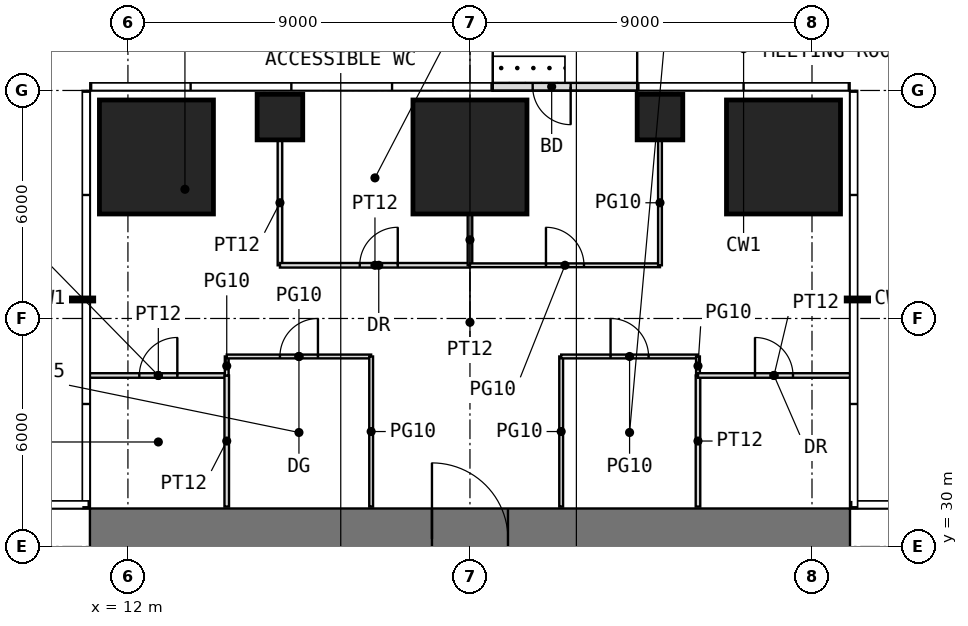
"""IFC4 building model, lengths in metres.
Left out: names, types, materials, properties, quantities, classifications, styles, units other than length and angle.
Written with IfcOpenShell. Run it as: python <this file> out.ifc"""

import sys

from ifc_helpers import new_model, si_unit, direction, frame, frame_2d, origin, origin_2d, place, context, subcontext, project, spatial, rectangle, extrude, element, fill, save


model = new_model("IFC4")
c1 = context("Model", 3, precision=1e-05, world=origin(), true_north=direction((0.0, 1.0)))
c2 = subcontext(c1, "Body", "Model", "MODEL_VIEW")
j1 = project(units=[si_unit("LENGTHUNIT", "METRE"), si_unit("PLANEANGLEUNIT", "RADIAN")], contexts=[c1])
p1 = place(None, origin())
s1 = spatial("IfcSite", under=j1, at=p1, CompositionType="ELEMENT")
p2 = place(p1, origin())
s2 = spatial("IfcBuilding", under=s1, at=p2, CompositionType="ELEMENT")
p3 = place(p2, frame((0.0, 0.0, 104.5)))
s3 = spatial("IfcBuildingStorey", under=s2, at=p3, CompositionType="ELEMENT", Elevation=104.5)
p4 = place(p3, frame((12.75, 40.25, 0.0), z_axis=(0.0, 0.0, 1.0), x_axis=(1.0, 0.0, 0.0)))
e1 = element("IfcColumn", 1, at=p4, inside=s3, PredefinedType="COLUMN", context=c2, shape_type="SweptSolid", body=[
    extrude(rectangle(XDim=3.0, YDim=3.0, at=origin_2d()), origin(), (0.0, 0.0, 1.0), 4.0),
])
p5 = place(p3, frame((16.0, 41.3, 0.0), z_axis=(0.0, 0.0, 1.0), x_axis=(1.0, 0.0, 0.0)))
e2 = element("IfcColumn", 2, at=p5, inside=s3, PredefinedType="COLUMN", context=c2, shape_type="SweptSolid", body=[
    extrude(rectangle(XDim=1.2, YDim=1.2, at=origin_2d()), origin(), (0.0, 0.0, 1.0), 4.0),
])
p6 = place(p3, frame((21.0, 40.25, 0.0), z_axis=(0.0, 0.0, 1.0), x_axis=(1.0, 0.0, 0.0)))
e3 = element("IfcColumn", 3, at=p6, inside=s3, PredefinedType="COLUMN", context=c2, shape_type="SweptSolid", body=[
    extrude(rectangle(XDim=3.0, YDim=3.0, at=origin_2d()), origin(), (0.0, 0.0, 1.0), 4.0),
])
p7 = place(p3, frame((26.0, 41.3, 0.0), z_axis=(0.0, 0.0, 1.0), x_axis=(1.0, 0.0, 0.0)))
e4 = element("IfcColumn", 4, at=p7, inside=s3, PredefinedType="COLUMN", context=c2, shape_type="SweptSolid", body=[
    extrude(rectangle(XDim=1.2, YDim=1.2, at=origin_2d()), origin(), (0.0, 0.0, 1.0), 4.0),
])
p8 = place(p3, frame((29.25, 40.25, 0.0), z_axis=(0.0, 0.0, 1.0), x_axis=(1.0, 0.0, 0.0)))
e5 = element("IfcColumn", 5, at=p8, inside=s3, PredefinedType="COLUMN", context=c2, shape_type="SweptSolid", body=[
    extrude(rectangle(XDim=3.0, YDim=3.0, at=origin_2d()), origin(), (0.0, 0.0, 1.0), 4.0),
])
p9 = place(p3, frame((25.4, 42.1, 0.0), z_axis=(0.0, 0.0, 1.0), x_axis=(-1.0, 0.0, 0.0)))
e6 = element("IfcWall", 6, at=p9, inside=s3, PredefinedType="USERDEFINED", context=c2, shape_type="SweptSolid", body=[
    extrude(rectangle(XDim=3.8, YDim=0.2, at=frame_2d((1.9, 0.0))), origin(), (0.0, 0.0, 1.0), 3.75),
])
p10 = place(p9, frame((1.75, 0.0, 0.0)))
e7 = element("IfcOpeningElement", 7, at=p10, cuts=e6, PredefinedType="OPENING", context=c2, shape_type="SweptSolid", body=[
    extrude(rectangle(XDim=1.0, YDim=2.4, at=frame_2d((0.5, 1.2))), frame((0.0, 0.11, 0.0), z_axis=(0.0, -1.0, 0.0), x_axis=(1.0, 0.0, 0.0)), (0.0, 0.0, 1.0), 0.22),
])
p11 = place(p3, frame((11.0, 30.2, -0.05), z_axis=(0.0, 0.0, 1.0), x_axis=(1.0, 0.0, 0.0)))
e8 = element("IfcWall", 8, at=p11, inside=s3, PredefinedType="SHEAR", context=c2, shape_type="SweptSolid", body=[
    extrude(rectangle(XDim=20.0, YDim=1.6, at=frame_2d((10.0, 0.0))), origin(), (0.0, 0.0, 1.0), 4.0),
])
p12 = place(p11, frame((9.0, 0.0, 0.05)))
e9 = element("IfcOpeningElement", 9, at=p12, cuts=e8, PredefinedType="OPENING", context=c2, shape_type="SweptSolid", body=[
    extrude(rectangle(XDim=2.0, YDim=2.2, at=frame_2d((1.0, 1.1))), frame((0.0, 0.81, 0.0), z_axis=(0.0, -1.0, 0.0), x_axis=(1.0, 0.0, 0.0)), (0.0, 0.0, 1.0), 1.62),
])
p13 = place(p3, frame((11.0, 34.5, 0.0), z_axis=(0.0, 0.0, 1.0), x_axis=(1.0, 0.0, 0.0)))
e10 = element("IfcWall", 10, at=p13, inside=s3, PredefinedType="PARTITIONING", context=c2, shape_type="SweptSolid", body=[
    extrude(rectangle(XDim=3.6, YDim=0.12, at=frame_2d((1.8, 0.0))), origin(), (0.0, 0.0, 1.0), 3.75),
])
p14 = place(p13, frame((1.3, 0.0, 0.0)))
e11 = element("IfcOpeningElement", 11, at=p14, cuts=e10, PredefinedType="OPENING", context=c2, shape_type="SweptSolid", body=[
    extrude(rectangle(XDim=1.0, YDim=2.2, at=frame_2d((0.5, 1.1))), frame((0.0, 0.07, 0.0), z_axis=(0.0, -1.0, 0.0), x_axis=(1.0, 0.0, 0.0)), (0.0, 0.0, 1.0), 0.14),
])
p15 = place(p3, frame((14.6, 31.05, 0.0), z_axis=(0.0, 0.0, 1.0), x_axis=(0.0, 1.0, 0.0)))
e12 = element("IfcWall", 12, at=p15, inside=s3, PredefinedType="PARTITIONING", context=c2, shape_type="SweptSolid", body=[
    extrude(rectangle(XDim=3.45, YDim=0.12, at=frame_2d((1.725, 0.0))), origin(), (0.0, 0.0, 1.0), 3.75),
])
p16 = place(p3, frame((14.6, 34.5, 0.0), z_axis=(0.0, 0.0, 1.0), x_axis=(0.0, 1.0, 0.0)))
e13 = element("IfcWall", 13, at=p16, inside=s3, PredefinedType="PARTITIONING", context=c2, shape_type="SweptSolid", body=[
    extrude(rectangle(XDim=0.5, YDim=0.1, at=frame_2d((0.25, 0.0))), origin(), (0.0, 0.0, 1.0), 3.75),
])
p17 = place(p3, frame((14.6, 35.0, 0.0), z_axis=(0.0, 0.0, 1.0), x_axis=(1.0, 0.0, 0.0)))
e14 = element("IfcWall", 14, at=p17, inside=s3, PredefinedType="PARTITIONING", context=c2, shape_type="SweptSolid", body=[
    extrude(rectangle(XDim=3.8, YDim=0.1, at=frame_2d((1.9, 0.0))), origin(), (0.0, 0.0, 1.0), 3.75),
])
p18 = place(p17, frame((1.4, 0.0, 0.0)))
e15 = element("IfcOpeningElement", 15, at=p18, cuts=e14, PredefinedType="OPENING", context=c2, shape_type="SweptSolid", body=[
    extrude(rectangle(XDim=1.0, YDim=2.4, at=frame_2d((0.5, 1.2))), frame((0.0, 0.06, 0.0), z_axis=(0.0, -1.0, 0.0), x_axis=(1.0, 0.0, 0.0)), (0.0, 0.0, 1.0), 0.12),
])
p19 = place(p3, frame((16.0, 37.4, 0.0), z_axis=(0.0, 0.0, 1.0), x_axis=(0.0, 1.0, 0.0)))
e16 = element("IfcWall", 16, at=p19, inside=s3, PredefinedType="PARTITIONING", context=c2, shape_type="SweptSolid", body=[
    extrude(rectangle(XDim=3.29, YDim=0.12, at=frame_2d((1.645, 0.0))), origin(), (0.0, 0.0, 1.0), 3.75),
])
p20 = place(p3, frame((16.0, 37.4, 0.0), z_axis=(0.0, 0.0, 1.0), x_axis=(1.0, 0.0, 0.0)))
e17 = element("IfcWall", 17, at=p20, inside=s3, PredefinedType="PARTITIONING", context=c2, shape_type="SweptSolid", body=[
    extrude(rectangle(XDim=5.0, YDim=0.12, at=frame_2d((2.5, 0.0))), origin(), (0.0, 0.0, 1.0), 3.75),
])
p21 = place(p20, frame((2.1, 0.0, 0.0)))
e18 = element("IfcOpeningElement", 18, at=p21, cuts=e17, PredefinedType="OPENING", context=c2, shape_type="SweptSolid", body=[
    extrude(rectangle(XDim=1.0, YDim=2.2, at=frame_2d((0.5, 1.1))), frame((0.0, 0.07, 0.0), z_axis=(0.0, -1.0, 0.0), x_axis=(1.0, 0.0, 0.0)), (0.0, 0.0, 1.0), 0.14),
])
p22 = place(p3, frame((18.4, 31.05, 0.0), z_axis=(0.0, 0.0, 1.0), x_axis=(0.0, 1.0, 0.0)))
e19 = element("IfcWall", 19, at=p22, inside=s3, PredefinedType="PARTITIONING", context=c2, shape_type="SweptSolid", body=[
    extrude(rectangle(XDim=3.95, YDim=0.1, at=frame_2d((1.975, 0.0))), origin(), (0.0, 0.0, 1.0), 3.75),
])
p23 = place(p3, frame((21.0, 37.4, 0.0), z_axis=(0.0, 0.0, 1.0), x_axis=(0.0, 1.0, 0.0)))
e20 = element("IfcWall", 20, at=p23, inside=s3, PredefinedType="PARTITIONING", context=c2, shape_type="SweptSolid", body=[
    extrude(rectangle(XDim=1.34, YDim=0.12, at=frame_2d((0.67, 0.0))), origin(), (0.0, 0.0, 1.0), 3.75),
])
p24 = place(p3, frame((21.0, 37.4, 0.0), z_axis=(0.0, 0.0, 1.0), x_axis=(1.0, 0.0, 0.0)))
e21 = element("IfcWall", 21, at=p24, inside=s3, PredefinedType="PARTITIONING", context=c2, shape_type="SweptSolid", body=[
    extrude(rectangle(XDim=5.0, YDim=0.1, at=frame_2d((2.5, 0.0))), origin(), (0.0, 0.0, 1.0), 3.75),
])
p25 = place(p24, frame((2.0, 0.0, 0.0)))
e22 = element("IfcOpeningElement", 22, at=p25, cuts=e21, PredefinedType="OPENING", context=c2, shape_type="SweptSolid", body=[
    extrude(rectangle(XDim=1.0, YDim=2.4, at=frame_2d((0.5, 1.2))), frame((0.0, 0.06, 0.0), z_axis=(0.0, -1.0, 0.0), x_axis=(1.0, 0.0, 0.0)), (0.0, 0.0, 1.0), 0.12),
])
p26 = place(p3, frame((23.4, 31.05, 0.0), z_axis=(0.0, 0.0, 1.0), x_axis=(0.0, 1.0, 0.0)))
e23 = element("IfcWall", 23, at=p26, inside=s3, PredefinedType="PARTITIONING", context=c2, shape_type="SweptSolid", body=[
    extrude(rectangle(XDim=3.95, YDim=0.1, at=frame_2d((1.975, 0.0))), origin(), (0.0, 0.0, 1.0), 3.75),
])
p27 = place(p3, frame((23.4, 35.0, 0.0), z_axis=(0.0, 0.0, 1.0), x_axis=(1.0, 0.0, 0.0)))
e24 = element("IfcWall", 24, at=p27, inside=s3, PredefinedType="PARTITIONING", context=c2, shape_type="SweptSolid", body=[
    extrude(rectangle(XDim=3.6, YDim=0.1, at=frame_2d((1.8, 0.0))), origin(), (0.0, 0.0, 1.0), 3.75),
])
p28 = place(p27, frame((1.3, 0.0, 0.0)))
e25 = element("IfcOpeningElement", 25, at=p28, cuts=e24, PredefinedType="OPENING", context=c2, shape_type="SweptSolid", body=[
    extrude(rectangle(XDim=1.0, YDim=2.4, at=frame_2d((0.5, 1.2))), frame((0.0, 0.06, 0.0), z_axis=(0.0, -1.0, 0.0), x_axis=(1.0, 0.0, 0.0)), (0.0, 0.0, 1.0), 0.12),
])
p29 = place(p3, frame((26.0, 37.4, 0.0), z_axis=(0.0, 0.0, 1.0), x_axis=(0.0, 1.0, 0.0)))
e26 = element("IfcWall", 26, at=p29, inside=s3, PredefinedType="PARTITIONING", context=c2, shape_type="SweptSolid", body=[
    extrude(rectangle(XDim=3.29, YDim=0.1, at=frame_2d((1.645, 0.0))), origin(), (0.0, 0.0, 1.0), 3.75),
])
p30 = place(p3, frame((27.0, 31.05, 0.0), z_axis=(0.0, 0.0, 1.0), x_axis=(0.0, 1.0, 0.0)))
e27 = element("IfcWall", 27, at=p30, inside=s3, PredefinedType="PARTITIONING", context=c2, shape_type="SweptSolid", body=[
    extrude(rectangle(XDim=3.45, YDim=0.12, at=frame_2d((1.725, 0.0))), origin(), (0.0, 0.0, 1.0), 3.75),
])
p31 = place(p3, frame((27.0, 34.5, 0.0), z_axis=(0.0, 0.0, 1.0), x_axis=(0.0, 1.0, 0.0)))
e28 = element("IfcWall", 28, at=p31, inside=s3, PredefinedType="PARTITIONING", context=c2, shape_type="SweptSolid", body=[
    extrude(rectangle(XDim=0.5, YDim=0.1, at=frame_2d((0.25, 0.0))), origin(), (0.0, 0.0, 1.0), 3.75),
])
p32 = place(p3, frame((27.0, 34.5, 0.0), z_axis=(0.0, 0.0, 1.0), x_axis=(1.0, 0.0, 0.0)))
e29 = element("IfcWall", 29, at=p32, inside=s3, PredefinedType="PARTITIONING", context=c2, shape_type="SweptSolid", body=[
    extrude(rectangle(XDim=4.0, YDim=0.12, at=frame_2d((2.0, 0.0))), origin(), (0.0, 0.0, 1.0), 3.75),
])
p33 = place(p32, frame((1.5, 0.0, 0.0)))
e30 = element("IfcOpeningElement", 30, at=p33, cuts=e29, PredefinedType="OPENING", context=c2, shape_type="SweptSolid", body=[
    extrude(rectangle(XDim=1.0, YDim=2.2, at=frame_2d((0.5, 1.1))), frame((0.0, 0.07, 0.0), z_axis=(0.0, -1.0, 0.0), x_axis=(1.0, 0.0, 0.0)), (0.0, 0.0, 1.0), 0.14),
])
p34 = place(p10, origin())
e31 = element("IfcDoor", 31, at=p34, inside=s3, OperationType="SINGLE_SWING_LEFT", PredefinedType="DOOR", context=c2, shape_type="SweptSolid", body=[
    extrude(rectangle(XDim=1.0, YDim=2.4, at=frame_2d((0.5, 1.2))), frame((0.0, 0.025, 0.0), z_axis=(0.0, -1.0, 0.0), x_axis=(1.0, 0.0, 0.0)), (0.0, 0.0, 1.0), 0.05),
])
fill(e7, e31)
p35 = place(p12, origin())
e32 = element("IfcDoor", 32, at=p35, inside=s3, OperationType="DOUBLE_DOOR_SINGLE_SWING", PredefinedType="DOOR", context=c2, shape_type="SweptSolid", body=[
    extrude(rectangle(XDim=2.0, YDim=2.2, at=frame_2d((1.0, 1.1))), frame((0.0, 0.025, 0.0), z_axis=(0.0, -1.0, 0.0), x_axis=(1.0, 0.0, 0.0)), (0.0, 0.0, 1.0), 0.05),
])
fill(e9, e32)
p36 = place(p14, origin())
e33 = element("IfcDoor", 33, at=p36, inside=s3, OperationType="SINGLE_SWING_RIGHT", PredefinedType="DOOR", context=c2, shape_type="SweptSolid", body=[
    extrude(rectangle(XDim=1.0, YDim=2.2, at=frame_2d((0.5, 1.1))), frame((0.0, 0.025, 0.0), z_axis=(0.0, -1.0, 0.0), x_axis=(1.0, 0.0, 0.0)), (0.0, 0.0, 1.0), 0.05),
])
fill(e11, e33)
p37 = place(p18, origin())
e34 = element("IfcDoor", 34, at=p37, inside=s3, OperationType="SINGLE_SWING_RIGHT", PredefinedType="DOOR", context=c2, shape_type="SweptSolid", body=[
    extrude(rectangle(XDim=1.0, YDim=2.4, at=frame_2d((0.5, 1.2))), frame((0.0, 0.025, 0.0), z_axis=(0.0, -1.0, 0.0), x_axis=(1.0, 0.0, 0.0)), (0.0, 0.0, 1.0), 0.05),
])
fill(e15, e34)
p38 = place(p28, origin())
e35 = element("IfcDoor", 35, at=p38, inside=s3, OperationType="SINGLE_SWING_LEFT", PredefinedType="DOOR", context=c2, shape_type="SweptSolid", body=[
    extrude(rectangle(XDim=1.0, YDim=2.4, at=frame_2d((0.5, 1.2))), frame((0.0, 0.025, 0.0), z_axis=(0.0, -1.0, 0.0), x_axis=(1.0, 0.0, 0.0)), (0.0, 0.0, 1.0), 0.05),
])
fill(e25, e35)
p39 = place(p33, origin())
e36 = element("IfcDoor", 36, at=p39, inside=s3, OperationType="SINGLE_SWING_LEFT", PredefinedType="DOOR", context=c2, shape_type="SweptSolid", body=[
    extrude(rectangle(XDim=1.0, YDim=2.2, at=frame_2d((0.5, 1.1))), frame((0.0, 0.025, 0.0), z_axis=(0.0, -1.0, 0.0), x_axis=(1.0, 0.0, 0.0)), (0.0, 0.0, 1.0), 0.05),
])
fill(e30, e36)
p40 = place(p21, origin())
e37 = element("IfcDoor", 37, at=p40, inside=s3, OperationType="SINGLE_SWING_RIGHT", PredefinedType="DOOR", context=c2, shape_type="SweptSolid", body=[
    extrude(rectangle(XDim=1.0, YDim=2.2, at=frame_2d((0.5, 1.1))), frame((0.0, 0.025, 0.0), z_axis=(0.0, -1.0, 0.0), x_axis=(1.0, 0.0, 0.0)), (0.0, 0.0, 1.0), 0.05),
])
fill(e18, e37)
p41 = place(p25, origin())
e38 = element("IfcDoor", 38, at=p41, inside=s3, OperationType="SINGLE_SWING_LEFT", PredefinedType="DOOR", context=c2, shape_type="SweptSolid", body=[
    extrude(rectangle(XDim=1.0, YDim=2.4, at=frame_2d((0.5, 1.2))), frame((0.0, 0.025, 0.0), z_axis=(0.0, -1.0, 0.0), x_axis=(1.0, 0.0, 0.0)), (0.0, 0.0, 1.0), 0.05),
])
fill(e22, e38)
save(model, sys.argv[1])
